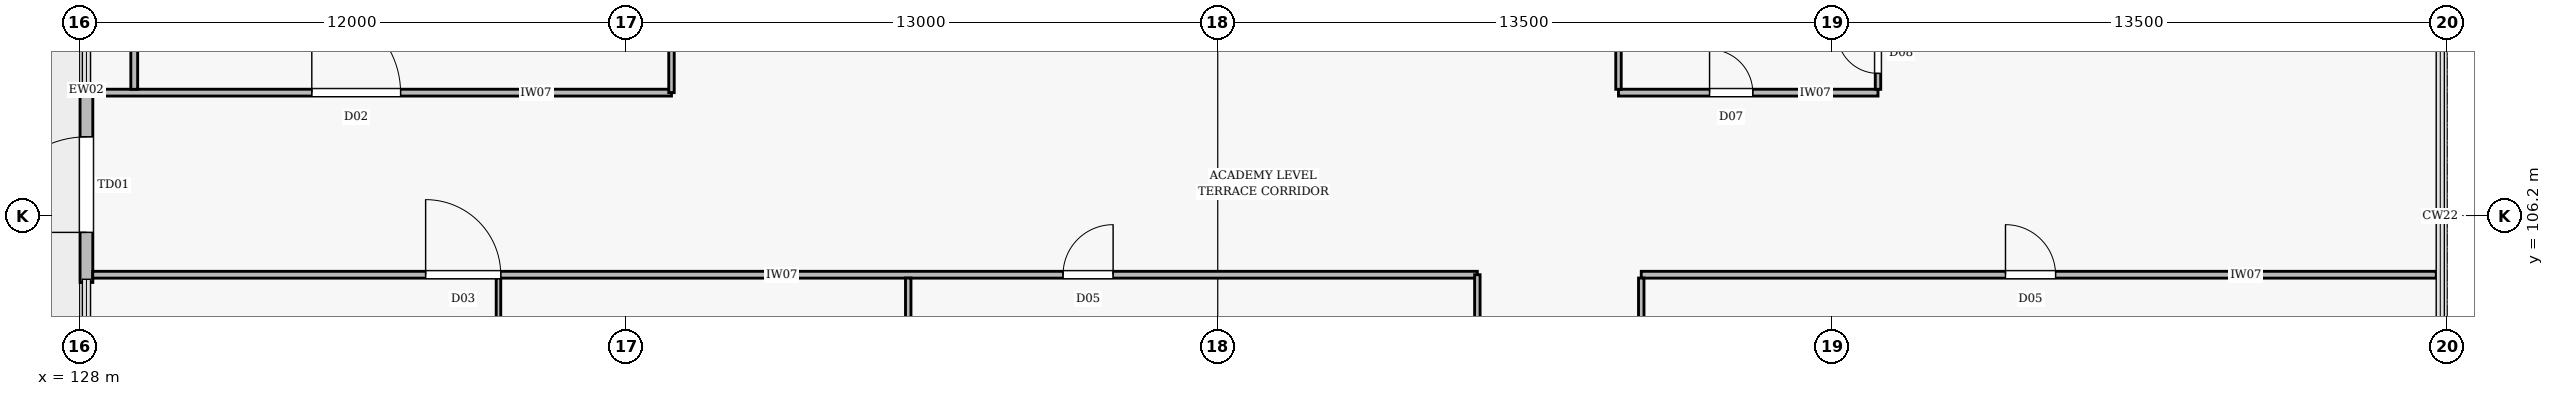
"""IFC4 building model, lengths in metres.
Left out: names, types, materials, properties, quantities, classifications, styles, units other than length and angle.
Written with IfcOpenShell. Run it as: python <this file> out.ifc"""

import sys

from ifc_helpers import new_model, si_unit, direction, frame, frame_2d, origin, place, context, subcontext, project, spatial, rectangle, extrude, element, fill, save


model = new_model("IFC4")
c1 = context("Model", 3, precision=1e-05, world=origin(), true_north=direction((0.0, 1.0)))
c2 = subcontext(c1, "Body", "Model", "MODEL_VIEW")
j1 = project(units=[si_unit("LENGTHUNIT", "METRE"), si_unit("PLANEANGLEUNIT", "RADIAN")], contexts=[c1])
p1 = place(None, origin())
s1 = spatial("IfcSite", under=j1, at=p1, CompositionType="ELEMENT")
p2 = place(p1, origin())
s2 = spatial("IfcBuilding", under=s1, at=p2, CompositionType="ELEMENT")
p3 = place(p2, frame((0.0, 0.0, 21.3)))
s3 = spatial("IfcBuildingStorey", under=s2, at=p3, CompositionType="ELEMENT", Elevation=21.3)
p4 = place(p3, frame((128.15, 104.73, 0.0), z_axis=(0.0, 0.0, 1.0), x_axis=(0.0, 1.0, 0.0)))
e1 = element("IfcWall", 1, at=p4, inside=s3, PredefinedType="STANDARD", context=c2, shape_type="SweptSolid", body=[
    extrude(rectangle(XDim=4.34, YDim=0.28, at=frame_2d((2.17, 0.0))), origin(), (0.0, 0.0, 1.0), 3.35),
])
p5 = place(p4, frame((1.1, 0.0, 0.005)))
e2 = element("IfcOpeningElement", 2, at=p5, cuts=e1, PredefinedType="OPENING", context=c2, shape_type="SweptSolid", body=[
    extrude(rectangle(XDim=2.1, YDim=2.3, at=frame_2d((1.05, 1.15))), frame((0.0, 0.152, 0.0), z_axis=(0.0, -1.0, 0.0), x_axis=(1.0, 0.0, 0.0)), (0.0, 0.0, 1.0), 0.304),
])
p6 = place(p3, frame((128.288, 104.9, 0.0), z_axis=(0.0, 0.0, 1.0), x_axis=(1.0, 0.0, 0.0)))
e3 = element("IfcWall", 3, at=p6, inside=s3, PredefinedType="PARTITIONING", context=c2, shape_type="SweptSolid", body=[
    extrude(rectangle(XDim=30.412, YDim=0.15, at=frame_2d((15.206, 0.0))), origin(), (0.0, 0.0, 1.0), 3.33),
])
p7 = place(p6, frame((7.312, 0.0, 0.005)))
e4 = element("IfcOpeningElement", 4, at=p7, cuts=e3, PredefinedType="OPENING", context=c2, shape_type="SweptSolid", body=[
    extrude(rectangle(XDim=1.65, YDim=2.2, at=frame_2d((0.825, 1.1))), frame((0.0, 0.087, 0.0), z_axis=(0.0, -1.0, 0.0), x_axis=(1.0, 0.0, 0.0)), (0.0, 0.0, 1.0), 0.174),
])
p8 = place(p6, frame((21.312, 0.0, 0.005)))
e5 = element("IfcOpeningElement", 5, at=p8, cuts=e3, PredefinedType="OPENING", context=c2, shape_type="SweptSolid", body=[
    extrude(rectangle(XDim=1.1, YDim=2.1, at=frame_2d((0.55, 1.05))), frame((0.0, 0.087, 0.0), z_axis=(0.0, -1.0, 0.0), x_axis=(1.0, 0.0, 0.0)), (0.0, 0.0, 1.0), 0.174),
])
p9 = place(p3, frame((162.3, 104.9, 0.0), z_axis=(0.0, 0.0, 1.0), x_axis=(1.0, 0.0, 0.0)))
e6 = element("IfcWall", 6, at=p9, inside=s3, PredefinedType="PARTITIONING", context=c2, shape_type="SweptSolid", body=[
    extrude(rectangle(XDim=17.462, YDim=0.15, at=frame_2d((8.731, 0.0))), origin(), (0.0, 0.0, 1.0), 3.31),
])
p10 = place(p9, frame((8.0, 0.0, 0.005)))
e7 = element("IfcOpeningElement", 7, at=p10, cuts=e6, PredefinedType="OPENING", context=c2, shape_type="SweptSolid", body=[
    extrude(rectangle(XDim=1.1, YDim=2.1, at=frame_2d((0.55, 1.05))), frame((0.0, 0.087, 0.0), z_axis=(0.0, -1.0, 0.0), x_axis=(1.0, 0.0, 0.0)), (0.0, 0.0, 1.0), 0.174),
])
p11 = place(p3, frame((158.7, 89.7, 0.0), z_axis=(0.0, 0.0, 1.0), x_axis=(0.0, 1.0, 0.0)))
e8 = element("IfcWall", 8, at=p11, inside=s3, PredefinedType="PARTITIONING", context=c2, shape_type="SweptSolid", body=[
    extrude(rectangle(XDim=15.2, YDim=0.12, at=frame_2d((7.6, 0.0))), origin(), (0.0, 0.0, 1.0), 3.12),
])
p12 = place(p11, frame((6.0, 0.0, 0.005)))
e9 = element("IfcOpeningElement", 9, at=p12, cuts=e8, PredefinedType="OPENING", context=c2, shape_type="SweptSolid", body=[
    extrude(rectangle(XDim=0.95, YDim=2.1, at=frame_2d((0.475, 1.05))), frame((0.0, 0.072, 0.0), z_axis=(0.0, -1.0, 0.0), x_axis=(1.0, 0.0, 0.0)), (0.0, 0.0, 1.0), 0.144),
])
p13 = place(p3, frame((162.3, 79.478, 0.0), z_axis=(0.0, 0.0, 1.0), x_axis=(0.0, 1.0, 0.0)))
e10 = element("IfcWall", 10, at=p13, inside=s3, PredefinedType="PARTITIONING", context=c2, shape_type="SweptSolid", body=[
    extrude(rectangle(XDim=25.349, YDim=0.12, at=frame_2d((12.674, 0.0))), origin(), (0.0, 0.0, 1.0), 3.12),
])
p14 = place(p13, frame((16.322, 0.0, 0.005)))
e11 = element("IfcOpeningElement", 11, at=p14, cuts=e10, PredefinedType="OPENING", context=c2, shape_type="SweptSolid", body=[
    extrude(rectangle(XDim=0.95, YDim=2.1, at=frame_2d((0.475, 1.05))), frame((0.0, 0.072, 0.0), z_axis=(0.0, -1.0, 0.0), x_axis=(1.0, 0.0, 0.0)), (0.0, 0.0, 1.0), 0.144),
])
p15 = place(p3, frame((128.288, 108.9, 0.0), z_axis=(0.0, 0.0, 1.0), x_axis=(1.0, 0.0, 0.0)))
e12 = element("IfcWall", 12, at=p15, inside=s3, PredefinedType="PARTITIONING", context=c2, shape_type="SweptSolid", body=[
    extrude(rectangle(XDim=12.712, YDim=0.15, at=frame_2d((6.356, 0.0))), origin(), (0.0, 0.0, 1.0), 3.33),
])
p16 = place(p15, frame((4.812, 0.0, 0.005)))
e13 = element("IfcOpeningElement", 13, at=p16, cuts=e12, PredefinedType="OPENING", context=c2, shape_type="SweptSolid", body=[
    extrude(rectangle(XDim=1.95, YDim=2.3, at=frame_2d((0.975, 1.15))), frame((0.0, 0.087, 0.0), z_axis=(0.0, -1.0, 0.0), x_axis=(1.0, 0.0, 0.0)), (0.0, 0.0, 1.0), 0.174),
])
p17 = place(p3, frame((141.0, 108.9, 0.0), z_axis=(0.0, 0.0, 1.0), x_axis=(0.0, 1.0, 0.0)))
e14 = element("IfcWall", 14, at=p17, inside=s3, PredefinedType="PARTITIONING", context=c2, shape_type="SweptSolid", body=[
    extrude(rectangle(XDim=3.4, YDim=0.12, at=frame_2d((1.7, 0.0))), origin(), (0.0, 0.0, 1.0), 3.12),
])
p18 = place(p3, frame((129.2, 108.973, 0.0), z_axis=(0.0, 0.0, 1.0), x_axis=(0.0, 1.0, 0.0)))
e15 = element("IfcWall", 15, at=p18, inside=s3, PredefinedType="PARTITIONING", context=c2, shape_type="SweptSolid", body=[
    extrude(rectangle(XDim=13.189, YDim=0.15, at=frame_2d((6.595, 0.0))), origin(), (0.0, 0.0, 1.0), 3.33),
])
p19 = place(p18, frame((4.573, 0.0, 0.005)))
e16 = element("IfcOpeningElement", 16, at=p19, cuts=e15, PredefinedType="OPENING", context=c2, shape_type="SweptSolid", body=[
    extrude(rectangle(XDim=1.0, YDim=2.15, at=frame_2d((0.5, 1.075))), frame((0.0, 0.087, 0.0), z_axis=(0.0, -1.0, 0.0), x_axis=(1.0, 0.0, 0.0)), (0.0, 0.0, 1.0), 0.174),
])
p20 = place(p3, frame((161.8, 108.9, 0.0), z_axis=(0.0, 0.0, 1.0), x_axis=(1.0, 0.0, 0.0)))
e17 = element("IfcWall", 17, at=p20, inside=s3, PredefinedType="PARTITIONING", context=c2, shape_type="SweptSolid", body=[
    extrude(rectangle(XDim=5.7, YDim=0.15, at=frame_2d((2.85, 0.0))), origin(), (0.0, 0.0, 1.0), 3.31),
])
p21 = place(p20, frame((2.0, 0.0, 0.005)))
e18 = element("IfcOpeningElement", 18, at=p21, cuts=e17, PredefinedType="OPENING", context=c2, shape_type="SweptSolid", body=[
    extrude(rectangle(XDim=0.95, YDim=2.1, at=frame_2d((0.475, 1.05))), frame((0.0, 0.087, 0.0), z_axis=(0.0, -1.0, 0.0), x_axis=(1.0, 0.0, 0.0)), (0.0, 0.0, 1.0), 0.174),
])
p22 = place(p3, frame((167.5, 108.973, 0.0), z_axis=(0.0, 0.0, 1.0), x_axis=(0.0, 1.0, 0.0)))
e19 = element("IfcWall", 19, at=p22, inside=s3, PredefinedType="PARTITIONING", context=c2, shape_type="SweptSolid", body=[
    extrude(rectangle(XDim=6.427, YDim=0.12, at=frame_2d((3.213, 0.0))), origin(), (0.0, 0.0, 1.0), 3.12),
])
p23 = place(p22, frame((0.35, 0.0, 0.005)))
e20 = element("IfcOpeningElement", 20, at=p23, cuts=e19, PredefinedType="OPENING", context=c2, shape_type="SweptSolid", body=[
    extrude(rectangle(XDim=0.9, YDim=2.1, at=frame_2d((0.45, 1.05))), frame((0.0, 0.072, 0.0), z_axis=(0.0, -1.0, 0.0), x_axis=(1.0, 0.0, 0.0)), (0.0, 0.0, 1.0), 0.144),
])
p24 = place(p3, frame((161.8, 108.973, 0.0), z_axis=(0.0, 0.0, 1.0), x_axis=(0.0, 1.0, 0.0)))
e21 = element("IfcWall", 21, at=p24, inside=s3, PredefinedType="PARTITIONING", context=c2, shape_type="SweptSolid", body=[
    extrude(rectangle(XDim=13.189, YDim=0.12, at=frame_2d((6.595, 0.0))), origin(), (0.0, 0.0, 1.0), 3.12),
])
p25 = place(p3, frame((146.2, 90.308, 0.0), z_axis=(0.0, 0.0, 1.0), x_axis=(0.0, 1.0, 0.0)))
e22 = element("IfcWall", 22, at=p25, inside=s3, PredefinedType="PARTITIONING", context=c2, shape_type="SweptSolid", body=[
    extrude(rectangle(XDim=14.519, YDim=0.12, at=frame_2d((7.259, 0.0))), origin(), (0.0, 0.0, 1.0), 3.12),
])
p26 = place(p3, frame((137.2, 90.308, 0.0), z_axis=(0.0, 0.0, 1.0), x_axis=(0.0, 1.0, 0.0)))
e23 = element("IfcWall", 23, at=p26, inside=s3, PredefinedType="MOVABLE", context=c2, shape_type="SweptSolid", body=[
    extrude(rectangle(XDim=14.519, YDim=0.1, at=frame_2d((7.259, 0.0))), origin(), (0.0, 0.0, 1.0), 3.37),
])
p27 = place(p5, origin())
e24 = element("IfcDoor", 24, at=p27, inside=s3, OperationType="SINGLE_SWING_LEFT", PredefinedType="DOOR", context=c2, shape_type="SweptSolid", body=[
    extrude(rectangle(XDim=2.1, YDim=2.3, at=frame_2d((1.05, 1.15))), frame((0.0, 0.025, 0.0), z_axis=(0.0, -1.0, 0.0), x_axis=(1.0, 0.0, 0.0)), (0.0, 0.0, 1.0), 0.05),
])
fill(e2, e24)
p28 = place(p7, origin())
e25 = element("IfcDoor", 25, at=p28, inside=s3, OperationType="DOUBLE_DOOR_SINGLE_SWING", PredefinedType="DOOR", context=c2, shape_type="SweptSolid", body=[
    extrude(rectangle(XDim=1.65, YDim=2.2, at=frame_2d((0.825, 1.1))), frame((0.0, 0.025, 0.0), z_axis=(0.0, -1.0, 0.0), x_axis=(1.0, 0.0, 0.0)), (0.0, 0.0, 1.0), 0.05),
])
fill(e4, e25)
p29 = place(p8, origin())
e26 = element("IfcDoor", 26, at=p29, inside=s3, OperationType="SINGLE_SWING_RIGHT", PredefinedType="DOOR", context=c2, shape_type="SweptSolid", body=[
    extrude(rectangle(XDim=1.1, YDim=2.1, at=frame_2d((0.55, 1.05))), frame((0.0, 0.025, 0.0), z_axis=(0.0, -1.0, 0.0), x_axis=(1.0, 0.0, 0.0)), (0.0, 0.0, 1.0), 0.05),
])
fill(e5, e26)
p30 = place(p10, origin())
e27 = element("IfcDoor", 27, at=p30, inside=s3, OperationType="SINGLE_SWING_LEFT", PredefinedType="DOOR", context=c2, shape_type="SweptSolid", body=[
    extrude(rectangle(XDim=1.1, YDim=2.1, at=frame_2d((0.55, 1.05))), frame((0.0, 0.025, 0.0), z_axis=(0.0, -1.0, 0.0), x_axis=(1.0, 0.0, 0.0)), (0.0, 0.0, 1.0), 0.05),
])
fill(e7, e27)
p31 = place(p16, origin())
e28 = element("IfcDoor", 28, at=p31, inside=s3, OperationType="DOUBLE_DOOR_SINGLE_SWING", PredefinedType="DOOR", context=c2, shape_type="SweptSolid", body=[
    extrude(rectangle(XDim=1.95, YDim=2.3, at=frame_2d((0.975, 1.15))), frame((0.0, 0.025, 0.0), z_axis=(0.0, -1.0, 0.0), x_axis=(1.0, 0.0, 0.0)), (0.0, 0.0, 1.0), 0.05),
])
fill(e13, e28)
p32 = place(p21, origin())
e29 = element("IfcDoor", 29, at=p32, inside=s3, OperationType="SINGLE_SWING_LEFT", PredefinedType="DOOR", context=c2, shape_type="SweptSolid", body=[
    extrude(rectangle(XDim=0.95, YDim=2.1, at=frame_2d((0.475, 1.05))), frame((0.0, 0.025, 0.0), z_axis=(0.0, -1.0, 0.0), x_axis=(1.0, 0.0, 0.0)), (0.0, 0.0, 1.0), 0.05),
])
fill(e18, e29)
p33 = place(p23, origin())
e30 = element("IfcDoor", 30, at=p33, inside=s3, OperationType="SINGLE_SWING_RIGHT", PredefinedType="DOOR", context=c2, shape_type="SweptSolid", body=[
    extrude(rectangle(XDim=0.9, YDim=2.1, at=frame_2d((0.45, 1.05))), frame((0.0, 0.025, 0.0), z_axis=(0.0, -1.0, 0.0), x_axis=(1.0, 0.0, 0.0)), (0.0, 0.0, 1.0), 0.05),
])
fill(e20, e30)
save(model, sys.argv[1])
